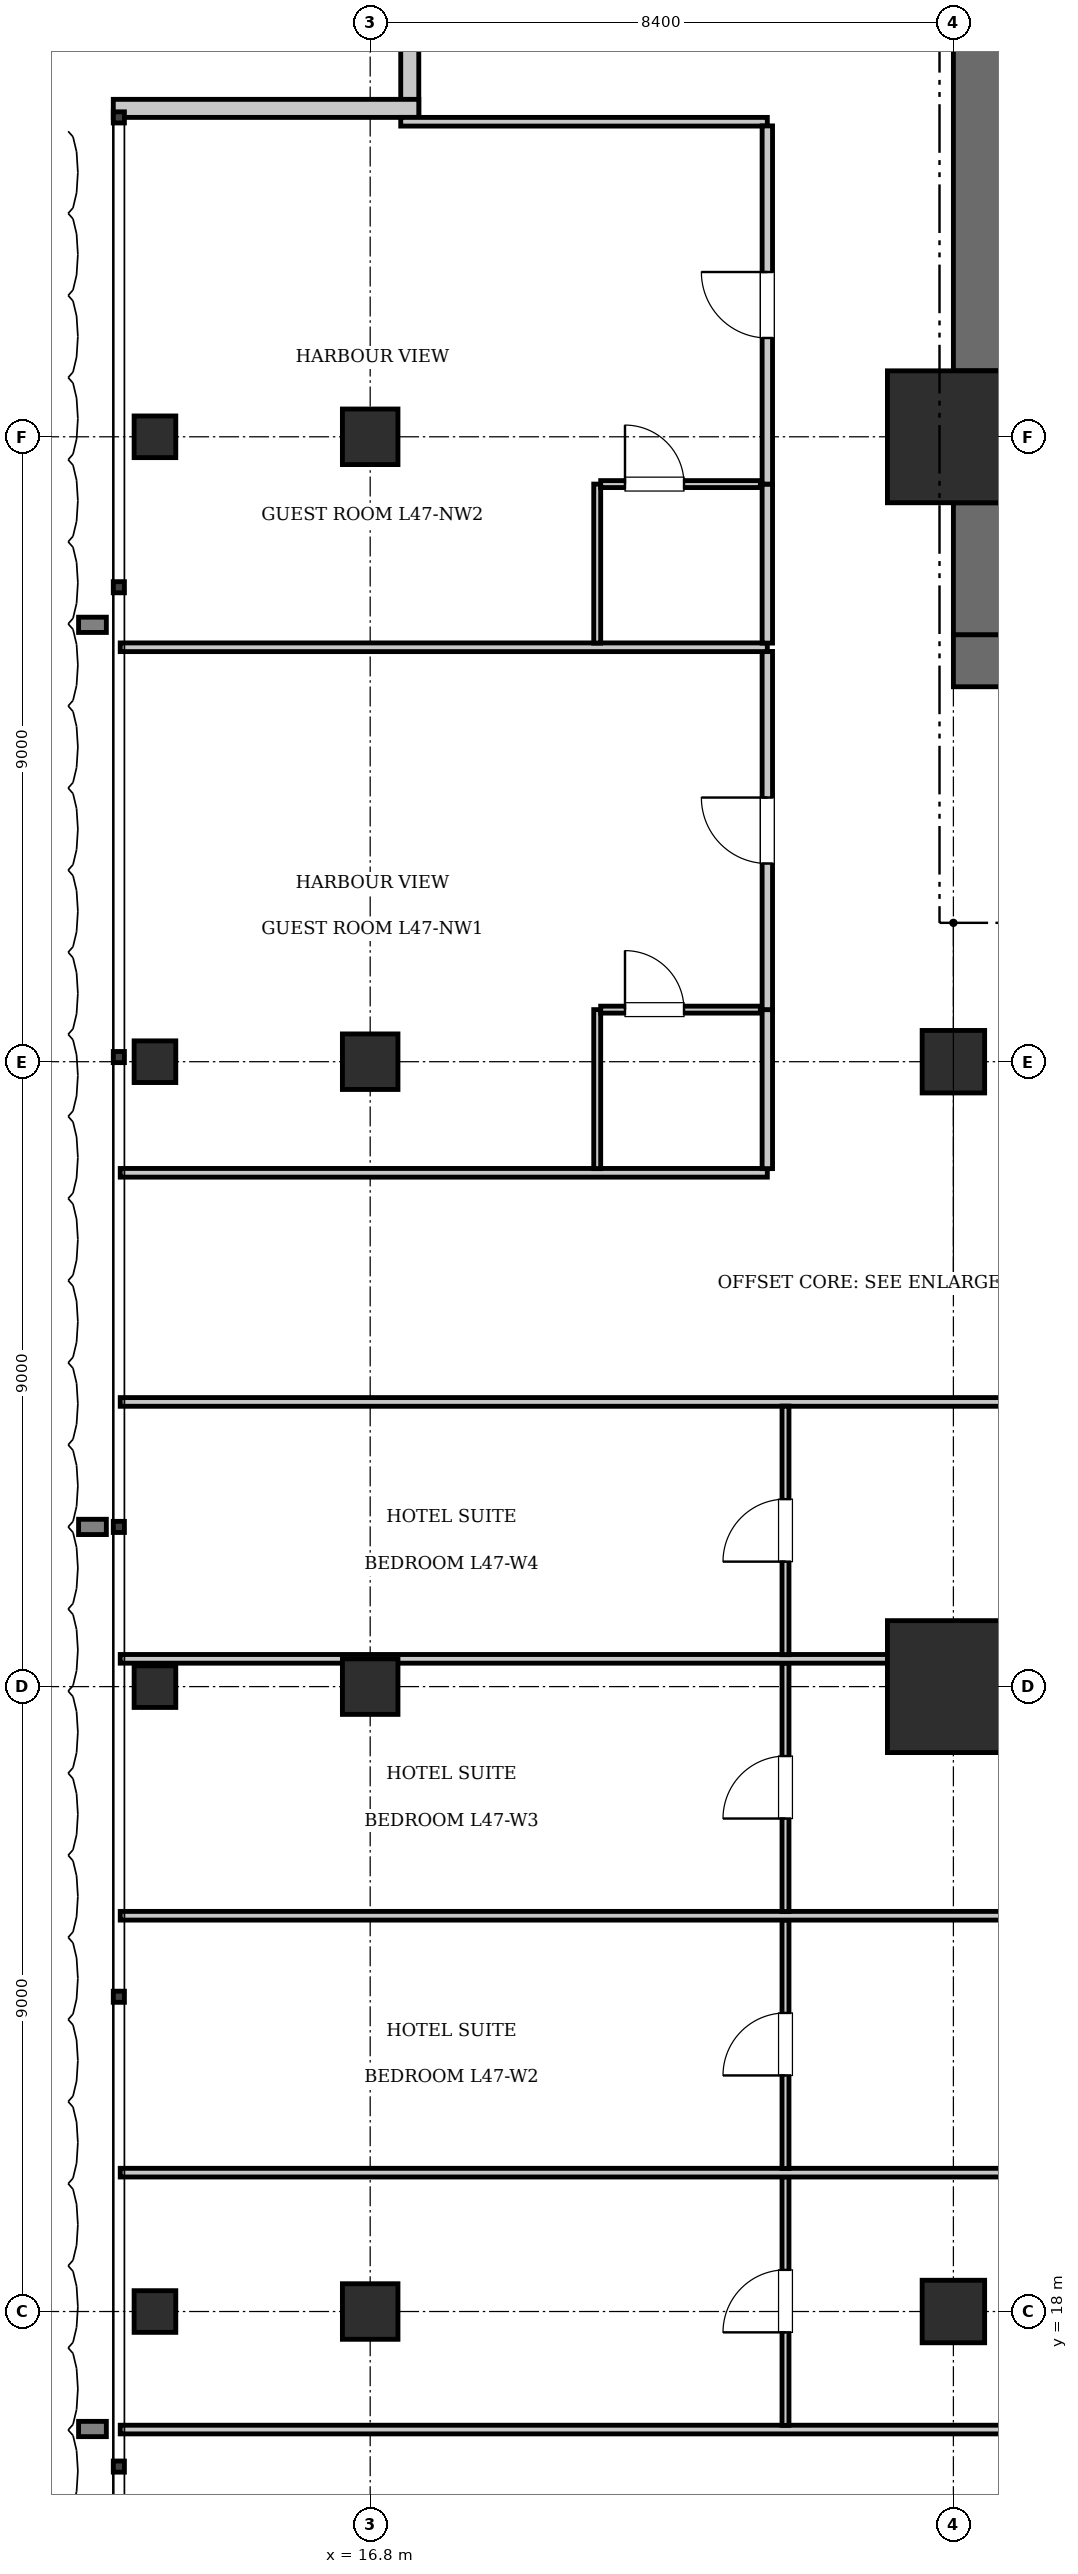
"""IFC4 building model, lengths in metres.
Left out: names, types, materials, properties, quantities, classifications, styles, units other than length and angle.
Written with IfcOpenShell. Run it as: python <this file> out.ifc"""

import sys

from ifc_helpers import new_model, si_unit, direction, frame, frame_2d, origin, origin_2d, place, context, subcontext, project, spatial, rectangle, i_section, extrude, element, fill, save


model = new_model("IFC4")
c1 = context("Model", 3, precision=1e-05, world=origin(), true_north=direction((0.0, 1.0)))
c2 = subcontext(c1, "Body", "Model", "MODEL_VIEW")
j1 = project(units=[si_unit("LENGTHUNIT", "METRE"), si_unit("PLANEANGLEUNIT", "RADIAN")], contexts=[c1])
p1 = place(None, origin())
s1 = spatial("IfcSite", under=j1, at=p1, CompositionType="ELEMENT")
p2 = place(p1, origin())
s2 = spatial("IfcBuilding", under=s1, at=p2, CompositionType="ELEMENT")
p3 = place(p2, frame((0.0, 0.0, 192.85)))
s3 = spatial("IfcBuildingStorey", under=s2, at=p3, CompositionType="ELEMENT", Elevation=192.85)
for number, where, z_axis, x_axis in (
    (1, (25.2, 27.0, 0.0), (0.0, 0.0, 1.0), (1.0, 0.0, 0.0)),
    (2, (25.2, 45.0, 0.0), (0.0, 0.0, 1.0), (1.0, 0.0, 0.0)),
):
    element("IfcColumn", number, at=place(p3, frame(where, z_axis=z_axis, x_axis=x_axis)), inside=s3, PredefinedType="COLUMN", context=c2, shape_type="SweptSolid", body=[
        extrude(rectangle(XDim=1.9, YDim=1.9, at=origin_2d()), origin(), (0.0, 0.0, 1.0), 3.85),
    ])
p4 = place(p3, frame((25.2, 41.775, 0.0), z_axis=(0.0, 0.0, 1.0), x_axis=(1.0, 0.0, 0.0)))
e3 = element("IfcWall", 3, at=p4, inside=s3, PredefinedType="SHEAR", context=c2, shape_type="SweptSolid", body=[
    extrude(rectangle(XDim=6.8, YDim=0.75, at=frame_2d((3.4, 0.0))), origin(), (0.0, 0.0, 1.0), 3.85),
])
p5 = place(p4, frame((1.65, 0.0, 0.0)))
e4 = element("IfcOpeningElement", 4, at=p5, cuts=e3, PredefinedType="OPENING", context=c2, shape_type="SweptSolid", body=[
    extrude(rectangle(XDim=1.15, YDim=2.15, at=frame_2d((0.575, 1.075))), frame((0.0, 0.385, 0.0), z_axis=(0.0, -1.0, 0.0), x_axis=(1.0, 0.0, 0.0)), (0.0, 0.0, 1.0), 0.77),
])
p6 = place(p4, frame((5.15, 0.0, 0.0)))
e5 = element("IfcOpeningElement", 5, at=p6, cuts=e3, PredefinedType="OPENING", context=c2, shape_type="SweptSolid", body=[
    extrude(rectangle(XDim=1.1, YDim=2.2, at=frame_2d((0.55, 1.1))), frame((0.0, 0.385, 0.0), z_axis=(0.0, -1.0, 0.0), x_axis=(1.0, 0.0, 0.0)), (0.0, 0.0, 1.0), 0.77),
])
p7 = place(p3, frame((25.575, 42.15, 0.0), z_axis=(0.0, 0.0, 1.0), x_axis=(0.0, 1.0, 0.0)))
e6 = element("IfcWall", 6, at=p7, inside=s3, PredefinedType="SHEAR", context=c2, shape_type="SweptSolid", body=[
    extrude(rectangle(XDim=1.9, YDim=0.75, at=frame_2d((0.95, 0.0))), origin(), (0.0, 0.0, 1.0), 3.85),
])
p8 = place(p3, frame((25.575, 45.95, 0.0), z_axis=(0.0, 0.0, 1.0), x_axis=(0.0, 1.0, 0.0)))
e7 = element("IfcWall", 7, at=p8, inside=s3, PredefinedType="SHEAR", context=c2, shape_type="SweptSolid", body=[
    extrude(rectangle(XDim=7.3, YDim=0.75, at=frame_2d((3.65, 0.0))), origin(), (0.0, 0.0, 1.0), 3.85),
])
for number, where, z_axis, x_axis in (
    (8, (25.2, 36.0, 0.0), (0.0, 0.0, 1.0), (1.0, 0.0, 0.0)),
    (9, (25.2, 18.0, 0.0), (0.0, 0.0, 1.0), (1.0, 0.0, 0.0)),
):
    element("IfcColumn", number, at=place(p3, frame(where, z_axis=z_axis, x_axis=x_axis)), inside=s3, PredefinedType="COLUMN", context=c2, shape_type="SweptSolid", body=[
        extrude(rectangle(XDim=0.9, YDim=0.9, at=origin_2d()), origin(), (0.0, 0.0, 1.0), 3.85),
    ])
for number, where, z_axis, x_axis in (
    (10, (16.8, 18.0, 0.0), (0.0, 0.0, 1.0), (1.0, 0.0, 0.0)),
    (11, (16.8, 27.0, 0.0), (0.0, 0.0, 1.0), (1.0, 0.0, 0.0)),
    (12, (16.8, 36.0, 0.0), (0.0, 0.0, 1.0), (1.0, 0.0, 0.0)),
    (13, (16.8, 45.0, 0.0), (0.0, 0.0, 1.0), (1.0, 0.0, 0.0)),
):
    element("IfcColumn", number, at=place(p3, frame(where, z_axis=z_axis, x_axis=x_axis)), inside=s3, PredefinedType="COLUMN", context=c2, shape_type="SweptSolid", body=[
        extrude(rectangle(XDim=0.8, YDim=0.8, at=origin_2d()), origin(), (0.0, 0.0, 1.0), 3.85),
    ])
for number, where, z_axis, x_axis in (
    (14, (13.7, 18.0, 0.0), (0.0, 0.0, 1.0), (1.0, 0.0, 0.0)),
    (15, (13.7, 27.0, 0.0), (0.0, 0.0, 1.0), (1.0, 0.0, 0.0)),
    (16, (13.7, 36.0, 0.0), (0.0, 0.0, 1.0), (1.0, 0.0, 0.0)),
    (17, (13.7, 45.0, 0.0), (0.0, 0.0, 1.0), (1.0, 0.0, 0.0)),
):
    element("IfcColumn", number, at=place(p3, frame(where, z_axis=z_axis, x_axis=x_axis)), inside=s3, PredefinedType="COLUMN", context=c2, shape_type="SweptSolid", body=[
        extrude(i_section(OverallWidth=0.6, OverallDepth=0.6, WebThickness=0.025, FlangeThickness=0.038, at=origin_2d()), origin(), (0.0, 0.0, 1.0), 3.85),
    ])
for number, where, z_axis, x_axis in (
    (18, (17.37, 49.6, 0.0), (0.0, 0.0, 1.0), (0.0, 1.0, 0.0)),
    (19, (13.1, 49.73, 0.0), (0.0, 0.0, 1.0), (1.0, 0.0, 0.0)),
):
    element("IfcWall", number, at=place(p3, frame(where, z_axis=z_axis, x_axis=x_axis)), inside=s3, PredefinedType="SOLIDWALL", context=c2, shape_type="SweptSolid", body=[
        extrude(rectangle(XDim=4.4, YDim=0.26, at=frame_2d((2.2, 0.0))), origin(), (0.0, 0.0, 1.0), 3.61),
    ])
for number, where, z_axis, x_axis in (
    (20, (13.2, 16.3, 0.0), (0.0, 0.0, 1.0), (1.0, 0.0, 0.0)),
    (21, (13.2, 31.1, 0.0), (0.0, 0.0, 1.0), (1.0, 0.0, 0.0)),
):
    element("IfcWall", number, at=place(p3, frame(where, z_axis=z_axis, x_axis=x_axis)), inside=s3, PredefinedType="PARTITIONING", context=c2, shape_type="SweptSolid", body=[
        extrude(rectangle(XDim=22.52, YDim=0.125, at=frame_2d((11.26, 0.0))), origin(), (0.0, 0.0, 1.0), 3.61),
    ])
p9 = place(p3, frame((22.781, 16.36, 0.0), z_axis=(0.0, 0.0, 1.0), x_axis=(0.0, 1.0, 0.0)))
e22 = element("IfcWall", 22, at=p9, inside=s3, PredefinedType="PARTITIONING", context=c2, shape_type="SweptSolid", body=[
    extrude(rectangle(XDim=3.58, YDim=0.1, at=frame_2d((1.79, 0.0))), origin(), (0.0, 0.0, 1.0), 3.61),
])
p10 = place(p9, frame((1.34, 0.0, 0.0)))
e23 = element("IfcOpeningElement", 23, at=p10, cuts=e22, PredefinedType="OPENING", context=c2, shape_type="SweptSolid", body=[
    extrude(rectangle(XDim=0.9, YDim=2.1, at=frame_2d((0.45, 1.05))), frame((0.0, 0.06, 0.0), z_axis=(0.0, -1.0, 0.0), x_axis=(1.0, 0.0, 0.0)), (0.0, 0.0, 1.0), 0.12),
])
p11 = place(p3, frame((13.2, 20.0, 0.0), z_axis=(0.0, 0.0, 1.0), x_axis=(1.0, 0.0, 0.0)))
e24 = element("IfcWall", 24, at=p11, inside=s3, PredefinedType="PARTITIONING", context=c2, shape_type="SweptSolid", body=[
    extrude(rectangle(XDim=22.52, YDim=0.125, at=frame_2d((11.26, 0.0))), origin(), (0.0, 0.0, 1.0), 3.61),
])
p12 = place(p3, frame((22.781, 20.06, 0.0), z_axis=(0.0, 0.0, 1.0), x_axis=(0.0, 1.0, 0.0)))
e25 = element("IfcWall", 25, at=p12, inside=s3, PredefinedType="PARTITIONING", context=c2, shape_type="SweptSolid", body=[
    extrude(rectangle(XDim=3.58, YDim=0.1, at=frame_2d((1.79, 0.0))), origin(), (0.0, 0.0, 1.0), 3.61),
])
p13 = place(p12, frame((1.34, 0.0, 0.0)))
e26 = element("IfcOpeningElement", 26, at=p13, cuts=e25, PredefinedType="OPENING", context=c2, shape_type="SweptSolid", body=[
    extrude(rectangle(XDim=0.9, YDim=2.1, at=frame_2d((0.45, 1.05))), frame((0.0, 0.06, 0.0), z_axis=(0.0, -1.0, 0.0), x_axis=(1.0, 0.0, 0.0)), (0.0, 0.0, 1.0), 0.12),
])
p14 = place(p3, frame((13.2, 23.7, 0.0), z_axis=(0.0, 0.0, 1.0), x_axis=(1.0, 0.0, 0.0)))
e27 = element("IfcWall", 27, at=p14, inside=s3, PredefinedType="PARTITIONING", context=c2, shape_type="SweptSolid", body=[
    extrude(rectangle(XDim=22.52, YDim=0.125, at=frame_2d((11.26, 0.0))), origin(), (0.0, 0.0, 1.0), 3.61),
])
p15 = place(p3, frame((22.781, 23.76, 0.0), z_axis=(0.0, 0.0, 1.0), x_axis=(0.0, 1.0, 0.0)))
e28 = element("IfcWall", 28, at=p15, inside=s3, PredefinedType="PARTITIONING", context=c2, shape_type="SweptSolid", body=[
    extrude(rectangle(XDim=3.58, YDim=0.1, at=frame_2d((1.79, 0.0))), origin(), (0.0, 0.0, 1.0), 3.61),
])
p16 = place(p15, frame((1.34, 0.0, 0.0)))
e29 = element("IfcOpeningElement", 29, at=p16, cuts=e28, PredefinedType="OPENING", context=c2, shape_type="SweptSolid", body=[
    extrude(rectangle(XDim=0.9, YDim=2.1, at=frame_2d((0.45, 1.05))), frame((0.0, 0.06, 0.0), z_axis=(0.0, -1.0, 0.0), x_axis=(1.0, 0.0, 0.0)), (0.0, 0.0, 1.0), 0.12),
])
p17 = place(p3, frame((13.2, 27.4, 0.0), z_axis=(0.0, 0.0, 1.0), x_axis=(1.0, 0.0, 0.0)))
e30 = element("IfcWall", 30, at=p17, inside=s3, PredefinedType="PARTITIONING", context=c2, shape_type="SweptSolid", body=[
    extrude(rectangle(XDim=22.52, YDim=0.125, at=frame_2d((11.26, 0.0))), origin(), (0.0, 0.0, 1.0), 3.61),
])
p18 = place(p3, frame((22.781, 27.46, 0.0), z_axis=(0.0, 0.0, 1.0), x_axis=(0.0, 1.0, 0.0)))
e31 = element("IfcWall", 31, at=p18, inside=s3, PredefinedType="PARTITIONING", context=c2, shape_type="SweptSolid", body=[
    extrude(rectangle(XDim=3.58, YDim=0.1, at=frame_2d((1.79, 0.0))), origin(), (0.0, 0.0, 1.0), 3.61),
])
p19 = place(p18, frame((1.34, 0.0, 0.0)))
e32 = element("IfcOpeningElement", 32, at=p19, cuts=e31, PredefinedType="OPENING", context=c2, shape_type="SweptSolid", body=[
    extrude(rectangle(XDim=0.9, YDim=2.1, at=frame_2d((0.45, 1.05))), frame((0.0, 0.06, 0.0), z_axis=(0.0, -1.0, 0.0), x_axis=(1.0, 0.0, 0.0)), (0.0, 0.0, 1.0), 0.12),
])
p20 = place(p3, frame((13.2, 34.4, 0.0), z_axis=(0.0, 0.0, 1.0), x_axis=(1.0, 0.0, 0.0)))
e33 = element("IfcWall", 33, at=p20, inside=s3, PredefinedType="PARTITIONING", context=c2, shape_type="SweptSolid", body=[
    extrude(rectangle(XDim=9.32, YDim=0.125, at=frame_2d((4.66, 0.0))), origin(), (0.0, 0.0, 1.0), 3.61),
])
p21 = place(p3, frame((17.24, 49.538, 0.0), z_axis=(0.0, 0.0, 1.0), x_axis=(1.0, 0.0, 0.0)))
e34 = element("IfcWall", 34, at=p21, inside=s3, PredefinedType="PARTITIONING", context=c2, shape_type="SweptSolid", body=[
    extrude(rectangle(XDim=5.28, YDim=0.125, at=frame_2d((2.64, 0.0))), origin(), (0.0, 0.0, 1.0), 3.61),
])
p22 = place(p3, frame((22.52, 34.46, 0.0), z_axis=(0.0, 0.0, 1.0), x_axis=(0.0, 1.0, 0.0)))
e35 = element("IfcWall", 35, at=p22, inside=s3, PredefinedType="PARTITIONING", context=c2, shape_type="SweptSolid", body=[
    extrude(rectangle(XDim=2.29, YDim=0.15, at=frame_2d((1.145, 0.0))), origin(), (0.0, 0.0, 1.0), 3.61),
])
p23 = place(p3, frame((22.52, 36.75, 0.0), z_axis=(0.0, 0.0, 1.0), x_axis=(0.0, 1.0, 0.0)))
e36 = element("IfcWall", 36, at=p23, inside=s3, PredefinedType="PARTITIONING", context=c2, shape_type="SweptSolid", body=[
    extrude(rectangle(XDim=5.159, YDim=0.15, at=frame_2d((2.579, 0.0))), origin(), (0.0, 0.0, 1.0), 3.61),
])
p24 = place(p23, frame((2.104, 0.0, 0.0)))
e37 = element("IfcOpeningElement", 37, at=p24, cuts=e36, PredefinedType="OPENING", context=c2, shape_type="SweptSolid", body=[
    extrude(rectangle(XDim=0.95, YDim=2.15, at=frame_2d((0.475, 1.075))), frame((0.0, 0.085, 0.0), z_axis=(0.0, -1.0, 0.0), x_axis=(1.0, 0.0, 0.0)), (0.0, 0.0, 1.0), 0.17),
])
p25 = place(p3, frame((20.07, 34.46, 0.0), z_axis=(0.0, 0.0, 1.0), x_axis=(0.0, 1.0, 0.0)))
e38 = element("IfcWall", 38, at=p25, inside=s3, PredefinedType="PARTITIONING", context=c2, shape_type="SweptSolid", body=[
    extrude(rectangle(XDim=2.29, YDim=0.1, at=frame_2d((1.145, 0.0))), origin(), (0.0, 0.0, 1.0), 3.61),
])
p26 = place(p3, frame((20.12, 36.75, 0.0), z_axis=(0.0, 0.0, 1.0), x_axis=(1.0, 0.0, 0.0)))
e39 = element("IfcWall", 39, at=p26, inside=s3, PredefinedType="PARTITIONING", context=c2, shape_type="SweptSolid", body=[
    extrude(rectangle(XDim=2.3, YDim=0.1, at=frame_2d((1.15, 0.0))), origin(), (0.0, 0.0, 1.0), 3.61),
])
p27 = place(p26, frame((0.35, 0.0, 0.0)))
e40 = element("IfcOpeningElement", 40, at=p27, cuts=e39, PredefinedType="OPENING", context=c2, shape_type="SweptSolid", body=[
    extrude(rectangle(XDim=0.85, YDim=2.1, at=frame_2d((0.425, 1.05))), frame((0.0, 0.06, 0.0), z_axis=(0.0, -1.0, 0.0), x_axis=(1.0, 0.0, 0.0)), (0.0, 0.0, 1.0), 0.12),
])
p28 = place(p3, frame((13.2, 41.969, 0.0), z_axis=(0.0, 0.0, 1.0), x_axis=(1.0, 0.0, 0.0)))
e41 = element("IfcWall", 41, at=p28, inside=s3, PredefinedType="PARTITIONING", context=c2, shape_type="SweptSolid", body=[
    extrude(rectangle(XDim=9.32, YDim=0.125, at=frame_2d((4.66, 0.0))), origin(), (0.0, 0.0, 1.0), 3.61),
])
p29 = place(p3, frame((22.52, 42.029, 0.0), z_axis=(0.0, 0.0, 1.0), x_axis=(0.0, 1.0, 0.0)))
e42 = element("IfcWall", 42, at=p29, inside=s3, PredefinedType="PARTITIONING", context=c2, shape_type="SweptSolid", body=[
    extrude(rectangle(XDim=2.29, YDim=0.15, at=frame_2d((1.145, 0.0))), origin(), (0.0, 0.0, 1.0), 3.61),
])
p30 = place(p3, frame((22.52, 44.319, 0.0), z_axis=(0.0, 0.0, 1.0), x_axis=(0.0, 1.0, 0.0)))
e43 = element("IfcWall", 43, at=p30, inside=s3, PredefinedType="PARTITIONING", context=c2, shape_type="SweptSolid", body=[
    extrude(rectangle(XDim=5.159, YDim=0.15, at=frame_2d((2.579, 0.0))), origin(), (0.0, 0.0, 1.0), 3.61),
])
p31 = place(p30, frame((2.104, 0.0, 0.0)))
e44 = element("IfcOpeningElement", 44, at=p31, cuts=e43, PredefinedType="OPENING", context=c2, shape_type="SweptSolid", body=[
    extrude(rectangle(XDim=0.95, YDim=2.15, at=frame_2d((0.475, 1.075))), frame((0.0, 0.085, 0.0), z_axis=(0.0, -1.0, 0.0), x_axis=(1.0, 0.0, 0.0)), (0.0, 0.0, 1.0), 0.17),
])
p32 = place(p3, frame((20.07, 42.029, 0.0), z_axis=(0.0, 0.0, 1.0), x_axis=(0.0, 1.0, 0.0)))
e45 = element("IfcWall", 45, at=p32, inside=s3, PredefinedType="PARTITIONING", context=c2, shape_type="SweptSolid", body=[
    extrude(rectangle(XDim=2.29, YDim=0.1, at=frame_2d((1.145, 0.0))), origin(), (0.0, 0.0, 1.0), 3.61),
])
p33 = place(p3, frame((20.12, 44.319, 0.0), z_axis=(0.0, 0.0, 1.0), x_axis=(1.0, 0.0, 0.0)))
e46 = element("IfcWall", 46, at=p33, inside=s3, PredefinedType="PARTITIONING", context=c2, shape_type="SweptSolid", body=[
    extrude(rectangle(XDim=2.3, YDim=0.1, at=frame_2d((1.15, 0.0))), origin(), (0.0, 0.0, 1.0), 3.61),
])
p34 = place(p33, frame((0.35, 0.0, 0.0)))
e47 = element("IfcOpeningElement", 47, at=p34, cuts=e46, PredefinedType="OPENING", context=c2, shape_type="SweptSolid", body=[
    extrude(rectangle(XDim=0.85, YDim=2.1, at=frame_2d((0.425, 1.05))), frame((0.0, 0.06, 0.0), z_axis=(0.0, -1.0, 0.0), x_axis=(1.0, 0.0, 0.0)), (0.0, 0.0, 1.0), 0.12),
])
p35 = place(p10, origin())
e48 = element("IfcDoor", 48, at=p35, inside=s3, OperationType="SINGLE_SWING_LEFT", PredefinedType="DOOR", context=c2, shape_type="SweptSolid", body=[
    extrude(rectangle(XDim=0.9, YDim=2.1, at=frame_2d((0.45, 1.05))), frame((0.0, 0.025, 0.0), z_axis=(0.0, -1.0, 0.0), x_axis=(1.0, 0.0, 0.0)), (0.0, 0.0, 1.0), 0.05),
])
fill(e23, e48)
p36 = place(p13, origin())
e49 = element("IfcDoor", 49, at=p36, inside=s3, OperationType="SINGLE_SWING_LEFT", PredefinedType="DOOR", context=c2, shape_type="SweptSolid", body=[
    extrude(rectangle(XDim=0.9, YDim=2.1, at=frame_2d((0.45, 1.05))), frame((0.0, 0.025, 0.0), z_axis=(0.0, -1.0, 0.0), x_axis=(1.0, 0.0, 0.0)), (0.0, 0.0, 1.0), 0.05),
])
fill(e26, e49)
p37 = place(p16, origin())
e50 = element("IfcDoor", 50, at=p37, inside=s3, OperationType="SINGLE_SWING_LEFT", PredefinedType="DOOR", context=c2, shape_type="SweptSolid", body=[
    extrude(rectangle(XDim=0.9, YDim=2.1, at=frame_2d((0.45, 1.05))), frame((0.0, 0.025, 0.0), z_axis=(0.0, -1.0, 0.0), x_axis=(1.0, 0.0, 0.0)), (0.0, 0.0, 1.0), 0.05),
])
fill(e29, e50)
p38 = place(p19, origin())
e51 = element("IfcDoor", 51, at=p38, inside=s3, OperationType="SINGLE_SWING_LEFT", PredefinedType="DOOR", context=c2, shape_type="SweptSolid", body=[
    extrude(rectangle(XDim=0.9, YDim=2.1, at=frame_2d((0.45, 1.05))), frame((0.0, 0.025, 0.0), z_axis=(0.0, -1.0, 0.0), x_axis=(1.0, 0.0, 0.0)), (0.0, 0.0, 1.0), 0.05),
])
fill(e32, e51)
p39 = place(p27, origin())
e52 = element("IfcDoor", 52, at=p39, inside=s3, OperationType="SINGLE_SWING_LEFT", PredefinedType="DOOR", context=c2, shape_type="SweptSolid", body=[
    extrude(rectangle(XDim=0.85, YDim=2.1, at=frame_2d((0.425, 1.05))), frame((0.0, 0.025, 0.0), z_axis=(0.0, -1.0, 0.0), x_axis=(1.0, 0.0, 0.0)), (0.0, 0.0, 1.0), 0.05),
])
fill(e40, e52)
p40 = place(p24, origin())
e53 = element("IfcDoor", 53, at=p40, inside=s3, OperationType="SINGLE_SWING_RIGHT", PredefinedType="DOOR", context=c2, shape_type="SweptSolid", body=[
    extrude(rectangle(XDim=0.95, YDim=2.15, at=frame_2d((0.475, 1.075))), frame((0.0, 0.025, 0.0), z_axis=(0.0, -1.0, 0.0), x_axis=(1.0, 0.0, 0.0)), (0.0, 0.0, 1.0), 0.05),
])
fill(e37, e53)
p41 = place(p34, origin())
e54 = element("IfcDoor", 54, at=p41, inside=s3, OperationType="SINGLE_SWING_LEFT", PredefinedType="DOOR", context=c2, shape_type="SweptSolid", body=[
    extrude(rectangle(XDim=0.85, YDim=2.1, at=frame_2d((0.425, 1.05))), frame((0.0, 0.025, 0.0), z_axis=(0.0, -1.0, 0.0), x_axis=(1.0, 0.0, 0.0)), (0.0, 0.0, 1.0), 0.05),
])
fill(e47, e54)
p42 = place(p31, origin())
e55 = element("IfcDoor", 55, at=p42, inside=s3, OperationType="SINGLE_SWING_RIGHT", PredefinedType="DOOR", context=c2, shape_type="SweptSolid", body=[
    extrude(rectangle(XDim=0.95, YDim=2.15, at=frame_2d((0.475, 1.075))), frame((0.0, 0.025, 0.0), z_axis=(0.0, -1.0, 0.0), x_axis=(1.0, 0.0, 0.0)), (0.0, 0.0, 1.0), 0.05),
])
fill(e44, e55)
save(model, sys.argv[1])
